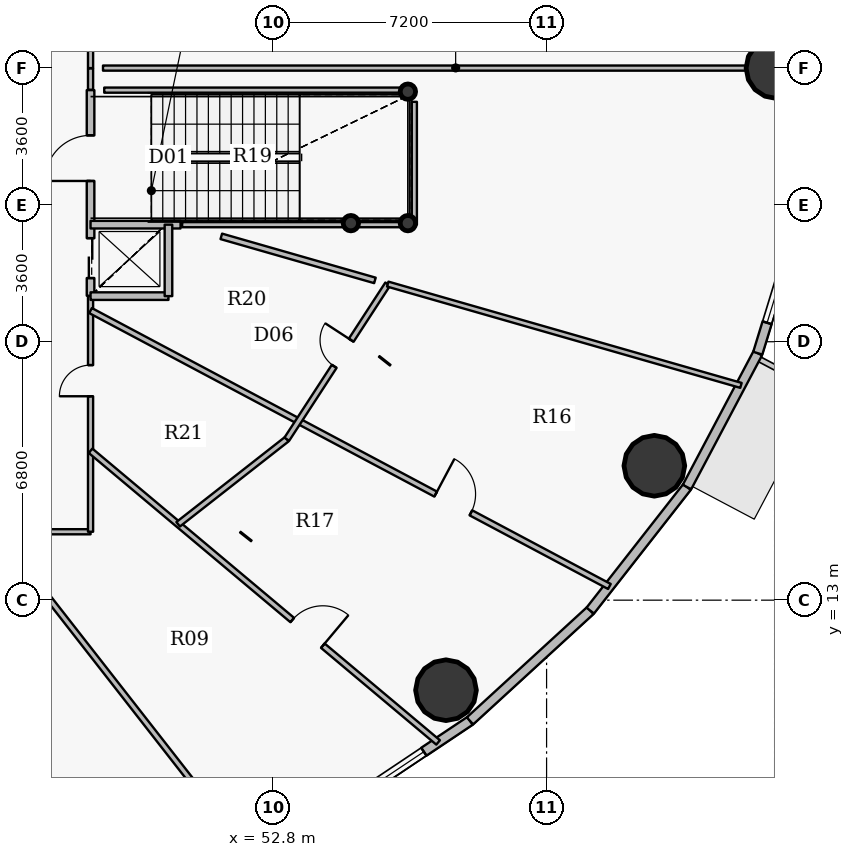
"""IFC4 building model, lengths in metres.
Left out: names, types, materials, properties, quantities, classifications, styles, units other than length and angle.
Written with IfcOpenShell. Run it as: python <this file> out.ifc"""

import sys

from ifc_helpers import new_model, si_unit, direction, frame, frame_2d, origin, origin_2d, place, context, subcontext, project, spatial, rectangle, hollow_circle, extrude, source, transform, mapped, element, fill, save


model = new_model("IFC4")
c1 = context("Model", 3, precision=1e-05, world=origin(), true_north=direction((0.0, 1.0)))
c2 = subcontext(c1, "Body", "Model", "MODEL_VIEW")
j1 = project(units=[si_unit("LENGTHUNIT", "METRE"), si_unit("PLANEANGLEUNIT", "RADIAN")], contexts=[c1])
p1 = place(None, origin())
s1 = spatial("IfcSite", under=j1, at=p1, CompositionType="ELEMENT")
p2 = place(p1, origin())
s2 = spatial("IfcBuilding", under=s1, at=p2, CompositionType="ELEMENT")
p3 = place(p2, frame((0.0, 0.0, 53.4)))
s3 = spatial("IfcBuildingStorey", under=s2, at=p3, CompositionType="ELEMENT", Elevation=53.4)
for number, where, z_axis, x_axis in (
    (1, (56.35, 26.38, 0.0), (0.0, 0.0, 1.0), (1.0, 0.0, 0.0)),
    (2, (56.35, 22.92, 0.0), (0.0, 0.0, 1.0), (1.0, 0.0, 0.0)),
    (3, (54.85, 22.92, 0.0), (0.0, 0.0, 1.0), (1.0, 0.0, 0.0)),
):
    element("IfcColumn", number, at=place(p3, frame(where, z_axis=z_axis, x_axis=x_axis)), inside=s3, PredefinedType="COLUMN", context=c2, shape_type="SweptSolid", body=[
        extrude(hollow_circle(Radius=0.203, WallThickness=0.016, at=origin_2d()), origin(), (0.0, 0.0, 1.0), 4.2),
    ])
for number, where, z_axis, x_axis in (
    (4, (66.05, 27.0, 0.0), (0.0, 0.0, 1.0), (1.0, 0.0, 0.0)),
    (5, (57.353, 10.631, 0.0), (0.0, 0.0, 1.0), (1.0, 0.0, 0.0)),
    (6, (62.835, 16.536, 0.0), (0.0, 0.0, 1.0), (1.0, 0.0, 0.0)),
):
    element("IfcColumn", number, at=place(p3, frame(where, z_axis=z_axis, x_axis=x_axis)), inside=s3, PredefinedType="COLUMN", context=c2, shape_type="SweptSolid", body=[
        extrude(hollow_circle(Radius=0.8, WallThickness=0.045, at=origin_2d()), origin(), (0.0, 0.0, 1.0), 4.2),
    ])
p4 = place(p3, frame((57.985, 9.824, 0.0), z_axis=(0.0, 0.0, 1.0), x_axis=(-0.831240982525, -0.555912249343, 0.0)))
e7 = element("IfcWall", 7, at=p4, inside=s3, PredefinedType="SOLIDWALL", context=c2, shape_type="SweptSolid", body=[
    extrude(rectangle(XDim=4.46, YDim=0.25, at=frame_2d((2.23, 0.0))), origin(), (0.0, 0.0, 1.0), 3.95),
])
p5 = place(p4, frame((1.461, 0.0, 0.9)))
e8 = element("IfcOpeningElement", 8, at=p5, cuts=e7, PredefinedType="OPENING", context=c2, shape_type="SweptSolid", body=[
    extrude(rectangle(XDim=2.2, YDim=2.0, at=origin_2d()), frame((1.1, 0.135, 1.0), z_axis=(0.0, -1.0, 0.0), x_axis=(1.0, 0.0, 0.0)), (0.0, 0.0, 1.0), 0.27),
])
p6 = place(p3, frame((61.15, 12.725, 0.0), z_axis=(0.0, 0.0, 1.0), x_axis=(-0.737116376281, -0.67576582321, 0.0)))
e9 = element("IfcWall", 9, at=p6, inside=s3, PredefinedType="SOLIDWALL", context=c2, shape_type="SweptSolid", body=[
    extrude(rectangle(XDim=4.294, YDim=0.25, at=frame_2d((2.147, 0.0))), origin(), (0.0, 0.0, 1.0), 3.95),
])
p7 = place(p3, frame((63.695, 15.977, 0.0), z_axis=(0.0, 0.0, 1.0), x_axis=(-0.616295508253, -0.787514981767, 0.0)))
e10 = element("IfcWall", 10, at=p7, inside=s3, PredefinedType="SOLIDWALL", context=c2, shape_type="SweptSolid", body=[
    extrude(rectangle(XDim=4.129, YDim=0.25, at=frame_2d((2.065, 0.0))), origin(), (0.0, 0.0, 1.0), 3.95),
])
p8 = place(p3, frame((65.558, 19.499, 0.0), z_axis=(0.0, 0.0, 1.0), x_axis=(-0.467662443071, -0.883907144072, 0.0)))
e11 = element("IfcWall", 11, at=p8, inside=s3, PredefinedType="SOLIDWALL", context=c2, shape_type="SweptSolid", body=[
    extrude(rectangle(XDim=3.984, YDim=0.25, at=frame_2d((1.992, 0.0))), origin(), (0.0, 0.0, 1.0), 3.95),
])
p9 = place(p3, frame((66.693, 23.203, 0.0), z_axis=(0.0, 0.0, 1.0), x_axis=(-0.293111631758, -0.956078224482, 0.0)))
e12 = element("IfcWall", 12, at=p9, inside=s3, PredefinedType="SOLIDWALL", context=c2, shape_type="SweptSolid", body=[
    extrude(rectangle(XDim=3.875, YDim=0.25, at=frame_2d((1.938, 0.0))), origin(), (0.0, 0.0, 1.0), 3.95),
])
p10 = place(p9, frame((0.837, 0.0, 0.9)))
e13 = element("IfcOpeningElement", 13, at=p10, cuts=e12, PredefinedType="OPENING", context=c2, shape_type="SweptSolid", body=[
    extrude(rectangle(XDim=2.2, YDim=2.0, at=origin_2d()), frame((1.1, 0.135, 1.0), z_axis=(0.0, -1.0, 0.0), x_axis=(1.0, 0.0, 0.0)), (0.0, 0.0, 1.0), 0.27),
])
p11 = place(p3, frame((39.828, 19.8, 0.0), z_axis=(0.0, 0.0, 1.0), x_axis=(0.469475400737, -0.882945552174, 0.0)))
e14 = element("IfcWall", 14, at=p11, inside=s3, PredefinedType="PARTITIONING", context=c2, shape_type="SweptSolid", body=[
    extrude(rectangle(XDim=17.188, YDim=0.15, at=frame_2d((8.594, 0.0))), origin(), (0.0, 0.0, 1.0), 3.335),
])
p12 = place(p11, frame((8.069, 0.0, 0.0)))
e15 = element("IfcOpeningElement", 15, at=p12, cuts=e14, PredefinedType="OPENING", context=c2, shape_type="SweptSolid", body=[
    extrude(rectangle(XDim=1.05, YDim=2.15, at=origin_2d()), frame((0.525, 0.085, 1.075), z_axis=(0.0, -1.0, 0.0), x_axis=(1.0, 0.0, 0.0)), (0.0, 0.0, 1.0), 0.17),
])
p13 = place(p3, frame((41.625, 19.8, 0.0), z_axis=(0.0, 0.0, 1.0), x_axis=(0.615654567116, -0.788016150843, 0.0)))
e16 = element("IfcWall", 16, at=p13, inside=s3, PredefinedType="PARTITIONING", context=c2, shape_type="SweptSolid", body=[
    extrude(rectangle(XDim=17.105, YDim=0.15, at=frame_2d((8.552, 0.0))), origin(), (0.0, 0.0, 1.0), 3.335),
])
p14 = place(p3, frame((46.05, 14.8, 0.0), z_axis=(0.0, 0.0, 1.0), x_axis=(1.0, 0.0, 0.0)))
e17 = element("IfcWall", 17, at=p14, inside=s3, PredefinedType="PARTITIONING", context=c2, shape_type="SweptSolid", body=[
    extrude(rectangle(XDim=1.95, YDim=0.135, at=frame_2d((0.975, 0.0))), origin(), (0.0, 0.0, 1.0), 3.95),
])
p15 = place(p3, frame((48.0, 14.8, 0.0), z_axis=(0.0, 0.0, 1.0), x_axis=(0.0, 1.0, 0.0)))
e18 = element("IfcWall", 18, at=p15, inside=s3, PredefinedType="PARTITIONING", context=c2, shape_type="SweptSolid", body=[
    extrude(rectangle(XDim=6.2, YDim=0.135, at=frame_2d((3.1, 0.0))), origin(), (0.0, 0.0, 1.0), 3.285),
])
p16 = place(p15, frame((3.565, 0.0, 0.0)))
e19 = element("IfcOpeningElement", 19, at=p16, cuts=e18, PredefinedType="OPENING", context=c2, shape_type="SweptSolid", body=[
    extrude(rectangle(XDim=0.82, YDim=2.1, at=origin_2d()), frame((0.41, 0.078, 1.05), z_axis=(0.0, -1.0, 0.0), x_axis=(1.0, 0.0, 0.0)), (0.0, 0.0, 1.0), 0.155),
])
p17 = place(p3, frame((48.0, 16.931, 0.0), z_axis=(0.0, 0.0, 1.0), x_axis=(0.766041142181, -0.642791543571, 0.0)))
e20 = element("IfcWall", 20, at=p17, inside=s3, PredefinedType="PARTITIONING", context=c2, shape_type="SweptSolid", body=[
    extrude(rectangle(XDim=11.939, YDim=0.15, at=frame_2d((5.969, 0.0))), origin(), (0.0, 0.0, 1.0), 3.335),
])
p18 = place(p17, frame((6.929, 0.0, 0.0)))
e21 = element("IfcOpeningElement", 21, at=p18, cuts=e20, PredefinedType="OPENING", context=c2, shape_type="SweptSolid", body=[
    extrude(rectangle(XDim=1.05, YDim=2.15, at=origin_2d()), frame((0.525, 0.085, 1.075), z_axis=(0.0, -1.0, 0.0), x_axis=(1.0, 0.0, 0.0)), (0.0, 0.0, 1.0), 0.17),
])
p19 = place(p3, frame((48.0, 20.619, 0.0), z_axis=(0.0, 0.0, 1.0), x_axis=(0.882949260716, -0.469468425989, 0.0)))
e22 = element("IfcWall", 22, at=p19, inside=s3, PredefinedType="PARTITIONING", context=c2, shape_type="SweptSolid", body=[
    extrude(rectangle(XDim=15.463, YDim=0.15, at=frame_2d((7.731, 0.0))), origin(), (0.0, 0.0, 1.0), 3.335),
])
p20 = place(p19, frame((10.285, 0.0, 0.0)))
e23 = element("IfcOpeningElement", 23, at=p20, cuts=e22, PredefinedType="OPENING", context=c2, shape_type="SweptSolid", body=[
    extrude(rectangle(XDim=1.05, YDim=2.15, at=origin_2d()), frame((0.525, 0.085, 1.075), z_axis=(0.0, -1.0, 0.0), x_axis=(1.0, 0.0, 0.0)), (0.0, 0.0, 1.0), 0.17),
])
p21 = place(p3, frame((48.0, 21.01, 0.0), z_axis=(0.0, 0.0, 1.0), x_axis=(0.0, 1.0, 0.0)))
e24 = element("IfcWall", 24, at=p21, inside=s3, PredefinedType="PARTITIONING", context=c2, shape_type="SweptSolid", body=[
    extrude(rectangle(XDim=5.41, YDim=0.2, at=frame_2d((2.705, 0.0))), origin(), (0.0, 0.0, 1.0), 3.285),
])
p22 = place(p21, frame((3.02, 0.0, 0.0)))
e25 = element("IfcOpeningElement", 25, at=p22, cuts=e24, PredefinedType="OPENING", context=c2, shape_type="SweptSolid", body=[
    extrude(rectangle(XDim=1.2, YDim=2.15, at=origin_2d()), frame((0.6, 0.11, 1.075), z_axis=(0.0, -1.0, 0.0), x_axis=(1.0, 0.0, 0.0)), (0.0, 0.0, 1.0), 0.22),
])
p23 = place(p21, frame((0.465, 0.0, 0.0)))
e26 = element("IfcOpeningElement", 26, at=p23, cuts=e24, PredefinedType="OPENING", context=c2, shape_type="SweptSolid", body=[
    extrude(rectangle(XDim=1.05, YDim=2.15, at=origin_2d()), frame((0.525, 0.11, 1.075), z_axis=(0.0, -1.0, 0.0), x_axis=(1.0, 0.0, 0.0)), (0.0, 0.0, 1.0), 0.22),
])
p24 = place(p3, frame((48.0, 21.0, 0.0), z_axis=(0.0, 0.0, 1.0), x_axis=(1.0, 0.0, 0.0)))
e27 = element("IfcWall", 27, at=p24, inside=s3, PredefinedType="PARTITIONING", context=c2, shape_type="SweptSolid", body=[
    extrude(rectangle(XDim=2.05, YDim=0.2, at=frame_2d((1.025, 0.0))), origin(), (0.0, 0.0, 1.0), 3.95),
])
p25 = place(p3, frame((48.0, 22.88, 0.0), z_axis=(0.0, 0.0, 1.0), x_axis=(1.0, 0.0, 0.0)))
e28 = element("IfcWall", 28, at=p25, inside=s3, PredefinedType="PARTITIONING", context=c2, shape_type="SweptSolid", body=[
    extrude(rectangle(XDim=2.368, YDim=0.2, at=frame_2d((1.184, 0.0))), origin(), (0.0, 0.0, 1.0), 3.95),
])
p26 = place(p3, frame((48.0, 27.0, 0.0), z_axis=(0.0, 0.0, 1.0), x_axis=(0.0, 1.0, 0.0)))
e29 = element("IfcWall", 29, at=p26, inside=s3, PredefinedType="PARTITIONING", context=c2, shape_type="SweptSolid", body=[
    extrude(rectangle(XDim=14.2, YDim=0.135, at=frame_2d((7.1, 0.0))), origin(), (0.0, 0.0, 1.0), 3.285),
])
p27 = place(p26, frame((3.542, 0.0, 0.0)))
e30 = element("IfcOpeningElement", 30, at=p27, cuts=e29, PredefinedType="OPENING", context=c2, shape_type="SweptSolid", body=[
    extrude(rectangle(XDim=1.05, YDim=2.15, at=origin_2d()), frame((0.525, 0.078, 1.075), z_axis=(0.0, -1.0, 0.0), x_axis=(1.0, 0.0, 0.0)), (0.0, 0.0, 1.0), 0.155),
])
p28 = place(p26, frame((10.602, 0.0, 0.0)))
e31 = element("IfcOpeningElement", 31, at=p28, cuts=e29, PredefinedType="OPENING", context=c2, shape_type="SweptSolid", body=[
    extrude(rectangle(XDim=1.05, YDim=2.15, at=origin_2d()), frame((0.525, 0.078, 1.075), z_axis=(0.0, -1.0, 0.0), x_axis=(1.0, 0.0, 0.0)), (0.0, 0.0, 1.0), 0.155),
])
p29 = place(p3, frame((50.05, 21.0, 0.0), z_axis=(0.0, 0.0, 1.0), x_axis=(0.0, 1.0, 0.0)))
e32 = element("IfcWall", 32, at=p29, inside=s3, PredefinedType="PARTITIONING", context=c2, shape_type="SweptSolid", body=[
    extrude(rectangle(XDim=1.88, YDim=0.2, at=frame_2d((0.94, 0.0))), origin(), (0.0, 0.0, 1.0), 3.285),
])
p30 = place(p3, frame((50.305, 14.997, 0.0), z_axis=(0.0, 0.0, 1.0), x_axis=(0.787346078754, 0.616511275056, 0.0)))
e33 = element("IfcWall", 33, at=p30, inside=s3, PredefinedType="PARTITIONING", context=c2, shape_type="SweptSolid", body=[
    extrude(rectangle(XDim=3.631, YDim=0.15, at=frame_2d((1.816, 0.0))), origin(), (0.0, 0.0, 1.0), 3.285),
])
p31 = place(p3, frame((53.164, 17.236, 0.0), z_axis=(0.0, 0.0, 1.0), x_axis=(0.545409482698, 0.838169729937, 0.0)))
e34 = element("IfcWall", 34, at=p31, inside=s3, PredefinedType="PARTITIONING", context=c2, shape_type="SweptSolid", body=[
    extrude(rectangle(XDim=4.869, YDim=0.15, at=frame_2d((2.435, 0.0))), origin(), (0.0, 0.0, 1.0), 3.285),
])
p32 = place(p31, frame((2.288, 0.0, 0.0)))
e35 = element("IfcOpeningElement", 35, at=p32, cuts=e34, PredefinedType="OPENING", context=c2, shape_type="SweptSolid", body=[
    extrude(rectangle(XDim=0.82, YDim=2.1, at=origin_2d()), frame((0.41, 0.085, 1.05), z_axis=(0.0, -1.0, 0.0), x_axis=(1.0, 0.0, 0.0)), (0.0, 0.0, 1.0), 0.17),
])
p33 = place(p3, frame((48.36, 26.42, 0.0), z_axis=(0.0, 0.0, 1.0), x_axis=(1.0, 0.0, 0.0)))
e36 = element("IfcWall", 36, at=p33, inside=s3, PredefinedType="PARTITIONING", context=c2, shape_type="SweptSolid", body=[
    extrude(rectangle(XDim=8.16, YDim=0.135, at=frame_2d((4.08, 0.0))), origin(), (0.0, 0.0, 1.0), 3.95),
])
p34 = place(p3, frame((56.52, 26.113, 0.0), z_axis=(0.0, 0.0, 1.0), x_axis=(0.0, -1.0, 0.0)))
e37 = element("IfcWall", 37, at=p34, inside=s3, PredefinedType="PARTITIONING", context=c2, shape_type="SweptSolid", body=[
    extrude(rectangle(XDim=3.233, YDim=0.135, at=frame_2d((1.616, 0.0))), origin(), (0.0, 0.0, 1.0), 3.95),
])
p35 = place(p3, frame((56.212, 22.88, 0.0), z_axis=(0.0, 0.0, 1.0), x_axis=(-1.0, 0.0, 0.0)))
e38 = element("IfcWall", 38, at=p35, inside=s3, PredefinedType="PARTITIONING", context=c2, shape_type="SweptSolid", body=[
    extrude(rectangle(XDim=5.802, YDim=0.135, at=frame_2d((2.901, 0.0))), origin(), (0.0, 0.0, 1.0), 3.95),
])
p36 = place(p3, frame((48.0, 26.99, 0.0), z_axis=(0.0, 0.0, 1.0), x_axis=(0.0, -1.0, 0.0)))
e39 = element("IfcWall", 39, at=p36, inside=s3, PredefinedType="PARTITIONING", context=c2, shape_type="SweptSolid", body=[
    extrude(rectangle(XDim=0.56, YDim=0.135, at=frame_2d((0.28, 0.0))), origin(), (0.0, 0.0, 1.0), 3.285),
])
p37 = place(p3, frame((67.08, 27.0, 0.0), z_axis=(0.0, 0.0, 1.0), x_axis=(-1.0, 0.0, 0.0)))
e40 = element("IfcWall", 40, at=p37, inside=s3, PredefinedType="PARTITIONING", context=c2, shape_type="SweptSolid", body=[
    extrude(rectangle(XDim=18.753, YDim=0.135, at=frame_2d((9.376, 0.0))), origin(), (0.0, 0.0, 1.0), 3.285),
])
p38 = place(p3, frame((51.44, 22.573, 0.0), z_axis=(0.0, 0.0, 1.0), x_axis=(0.961265031159, -0.275625724255, 0.0)))
e41 = element("IfcWall", 41, at=p38, inside=s3, PredefinedType="PARTITIONING", context=c2, shape_type="SweptSolid", body=[
    extrude(rectangle(XDim=4.206, YDim=0.15, at=frame_2d((2.103, 0.0))), origin(), (0.0, 0.0, 1.0), 3.95),
])
p39 = place(p3, frame((55.82, 21.317, 0.0), z_axis=(0.0, 0.0, 1.0), x_axis=(0.961261497428, -0.275638048104, 0.0)))
e42 = element("IfcWall", 42, at=p39, inside=s3, PredefinedType="PARTITIONING", context=c2, shape_type="SweptSolid", body=[
    extrude(rectangle(XDim=9.669, YDim=0.135, at=frame_2d((4.835, 0.0))), origin(), (0.0, 0.0, 1.0), 3.335),
])
m1 = source(origin(), c2, "Body", "SweptSolid", [
    extrude(rectangle(XDim=2.2, YDim=2.0, at=origin_2d()), frame((1.1, 0.03, 1.0), z_axis=(0.0, -1.0, 0.0), x_axis=(1.0, 0.0, 0.0)), (0.0, 0.0, 1.0), 0.06),
])
p40 = place(p5, origin())
e43 = element("IfcWindow", 43, at=p40, inside=s3, PartitioningType="TRIPLE_PANEL_VERTICAL", PredefinedType="WINDOW", context=c2, shape_type="MappedRepresentation", body=[
    mapped(m1, transform((0.0, 0.0, 0.0), x_axis=(1.0, 0.0, 0.0), y_axis=(0.0, 1.0, 0.0), z_axis=(0.0, 0.0, 1.0), scale=1.0)),
])
fill(e8, e43)
p41 = place(p10, origin())
e44 = element("IfcWindow", 44, at=p41, inside=s3, PartitioningType="TRIPLE_PANEL_VERTICAL", PredefinedType="WINDOW", context=c2, shape_type="MappedRepresentation", body=[
    mapped(m1, transform((0.0, 0.0, 0.0), x_axis=(1.0, 0.0, 0.0), y_axis=(0.0, 1.0, 0.0), z_axis=(0.0, 0.0, 1.0), scale=1.0)),
])
fill(e13, e44)
m2 = source(origin(), c2, "Body", "SweptSolid", [
    extrude(rectangle(XDim=1.2, YDim=2.15, at=origin_2d()), frame((0.6, 0.025, 1.075), z_axis=(0.0, -1.0, 0.0), x_axis=(1.0, 0.0, 0.0)), (0.0, 0.0, 1.0), 0.05),
])
p42 = place(p22, origin())
e45 = element("IfcDoor", 45, at=p42, inside=s3, OperationType="SINGLE_SWING_LEFT", PredefinedType="DOOR", context=c2, shape_type="MappedRepresentation", body=[
    mapped(m2, transform((0.0, 0.0, 0.0), x_axis=(1.0, 0.0, 0.0), y_axis=(0.0, 1.0, 0.0), z_axis=(0.0, 0.0, 1.0), scale=1.0)),
])
fill(e25, e45)
m3 = source(origin(), c2, "Body", "SweptSolid", [
    extrude(rectangle(XDim=1.05, YDim=2.15, at=origin_2d()), frame((0.525, 0.025, 1.075), z_axis=(0.0, -1.0, 0.0), x_axis=(1.0, 0.0, 0.0)), (0.0, 0.0, 1.0), 0.05),
])
p43 = place(p23, origin())
e46 = element("IfcDoor", 46, at=p43, inside=s3, OperationType="DOUBLE_DOOR_SLIDING", PredefinedType="USERDEFINED", context=c2, shape_type="MappedRepresentation", body=[
    mapped(m3, transform((0.0, 0.0, 0.0), x_axis=(1.0, 0.0, 0.0), y_axis=(0.0, 1.0, 0.0), z_axis=(0.0, 0.0, 1.0), scale=1.0)),
])
fill(e26, e46)
m4 = source(origin(), c2, "Body", "SweptSolid", [
    extrude(rectangle(XDim=0.82, YDim=2.1, at=origin_2d()), frame((0.41, 0.025, 1.05), z_axis=(0.0, -1.0, 0.0), x_axis=(1.0, 0.0, 0.0)), (0.0, 0.0, 1.0), 0.05),
])
p44 = place(p16, origin())
e47 = element("IfcDoor", 47, at=p44, inside=s3, OperationType="SINGLE_SWING_LEFT", PredefinedType="DOOR", context=c2, shape_type="MappedRepresentation", body=[
    mapped(m4, transform((0.0, 0.0, 0.0), x_axis=(1.0, 0.0, 0.0), y_axis=(0.0, 1.0, 0.0), z_axis=(0.0, 0.0, 1.0), scale=1.0)),
])
fill(e19, e47)
m5 = source(origin(), c2, "Body", "SweptSolid", [
    extrude(rectangle(XDim=1.05, YDim=2.15, at=origin_2d()), frame((0.525, 0.025, 1.075), z_axis=(0.0, -1.0, 0.0), x_axis=(1.0, 0.0, 0.0)), (0.0, 0.0, 1.0), 0.05),
])
p45 = place(p18, origin())
e48 = element("IfcDoor", 48, at=p45, inside=s3, OperationType="SINGLE_SWING_RIGHT", PredefinedType="DOOR", context=c2, shape_type="MappedRepresentation", body=[
    mapped(m5, transform((0.0, 0.0, 0.0), x_axis=(1.0, 0.0, 0.0), y_axis=(0.0, 1.0, 0.0), z_axis=(0.0, 0.0, 1.0), scale=1.0)),
])
fill(e21, e48)
p46 = place(p20, origin())
e49 = element("IfcDoor", 49, at=p46, inside=s3, OperationType="SINGLE_SWING_LEFT", PredefinedType="DOOR", context=c2, shape_type="MappedRepresentation", body=[
    mapped(m5, transform((0.0, 0.0, 0.0), x_axis=(1.0, 0.0, 0.0), y_axis=(0.0, 1.0, 0.0), z_axis=(0.0, 0.0, 1.0), scale=1.0)),
])
fill(e23, e49)
p47 = place(p32, origin())
e50 = element("IfcDoor", 50, at=p47, inside=s3, OperationType="SINGLE_SWING_RIGHT", PredefinedType="DOOR", context=c2, shape_type="MappedRepresentation", body=[
    mapped(m4, transform((0.0, 0.0, 0.0), x_axis=(1.0, 0.0, 0.0), y_axis=(0.0, 1.0, 0.0), z_axis=(0.0, 0.0, 1.0), scale=1.0)),
])
fill(e35, e50)
save(model, sys.argv[1])
